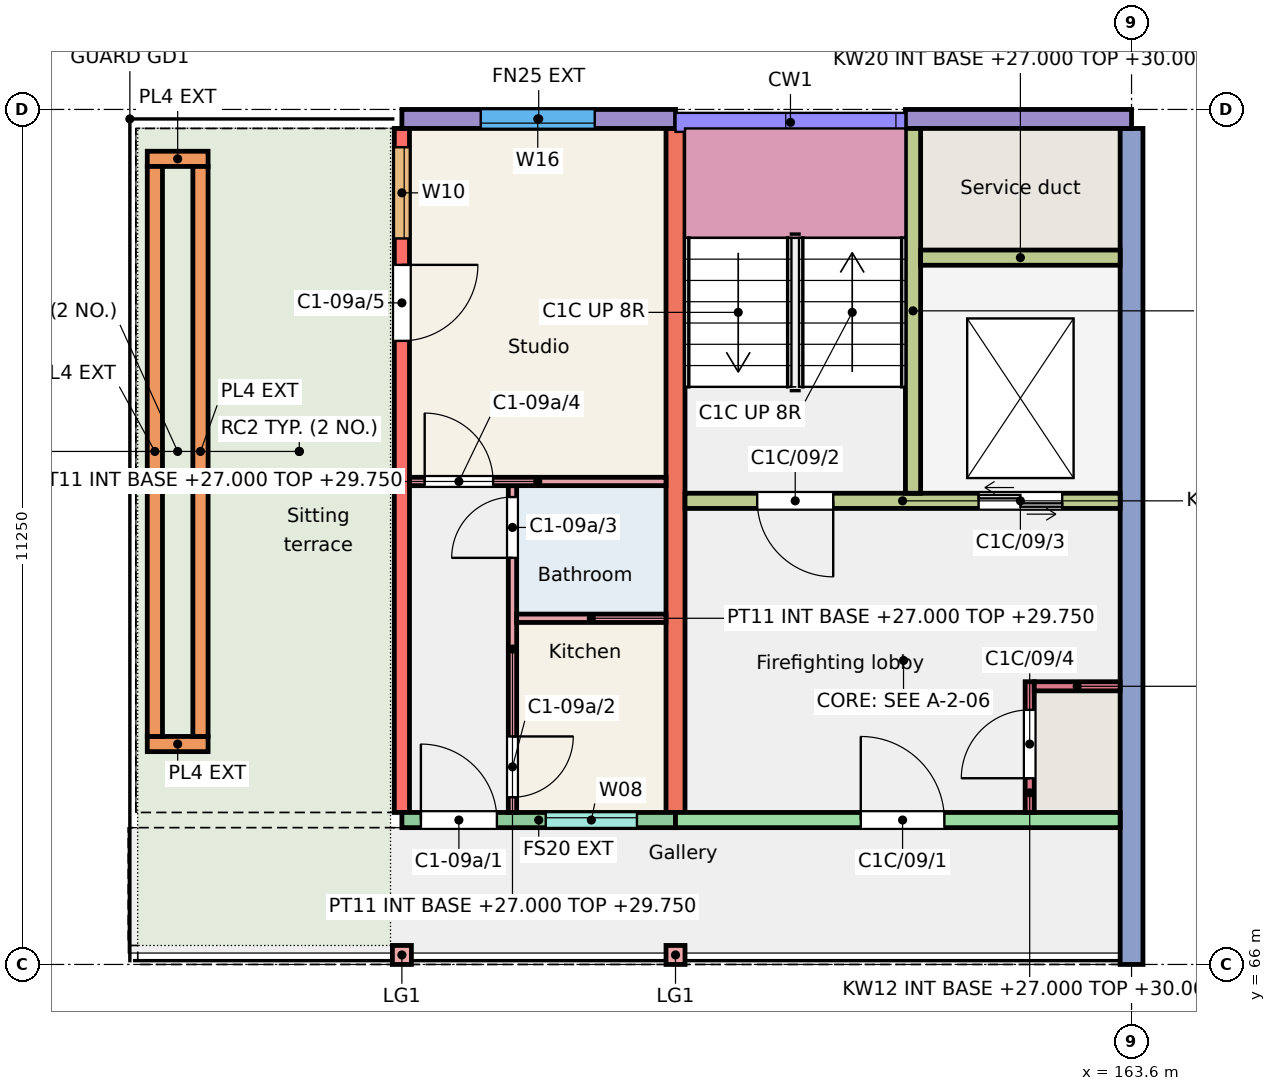
"""IFC4 building model, lengths in metres.
Left out: names, types, materials, properties, quantities, classifications, styles, units other than length and angle.
Written with IfcOpenShell. Run it as: python <this file> out.ifc"""

import sys

from ifc_helpers import new_model, si_unit, direction, frame, frame_2d, origin, origin_2d, place, context, subcontext, project, spatial, rectangle, extrude, element, fill, save


model = new_model("IFC4")
c1 = context("Model", 3, precision=1e-05, world=origin(), true_north=direction((0.0, 1.0)))
c2 = subcontext(c1, "Body", "Model", "MODEL_VIEW")
j1 = project(units=[si_unit("LENGTHUNIT", "METRE"), si_unit("PLANEANGLEUNIT", "RADIAN")], contexts=[c1])
p1 = place(None, origin())
s1 = spatial("IfcSite", under=j1, at=p1, CompositionType="ELEMENT")
p2 = place(p1, origin())
s2 = spatial("IfcBuilding", under=s1, at=p2, CompositionType="ELEMENT")
p3 = place(p2, frame((0.0, 0.0, 27.0)))
s3 = spatial("IfcBuildingStorey", under=s2, at=p3, CompositionType="ELEMENT", Elevation=27.0)
p4 = place(p3, frame((154.0, 68.0, 0.0), z_axis=(0.0, 0.0, 1.0), x_axis=(0.0, 1.0, 0.0)))
e1 = element("IfcWall", 1, at=p4, inside=s3, PredefinedType="SHEAR", context=c2, shape_type="SweptSolid", body=[
    extrude(rectangle(XDim=9.0, YDim=0.2, at=frame_2d((4.5, 0.0))), origin(), (0.0, 0.0, 1.0), 3.0),
])
p5 = place(p4, frame((7.552, 0.0, 0.9)))
e2 = element("IfcOpeningElement", 2, at=p5, cuts=e1, PredefinedType="OPENING", context=c2, shape_type="SweptSolid", body=[
    extrude(rectangle(XDim=1.2, YDim=1.5, at=frame_2d((0.6, 0.75))), frame((0.0, 0.11, 0.0), z_axis=(0.0, -1.0, 0.0), x_axis=(1.0, 0.0, 0.0)), (0.0, 0.0, 1.0), 0.22),
])
p6 = place(p4, frame((6.205, 0.0, 0.0)))
e3 = element("IfcOpeningElement", 3, at=p6, cuts=e1, PredefinedType="OPENING", context=c2, shape_type="SweptSolid", body=[
    extrude(rectangle(XDim=1.0, YDim=2.1, at=frame_2d((0.5, 1.05))), frame((0.0, 0.11, 0.0), z_axis=(0.0, -1.0, 0.0), x_axis=(1.0, 0.0, 0.0)), (0.0, 0.0, 1.0), 0.22),
])
p7 = place(p3, frame((157.6, 68.0, 0.0), z_axis=(0.0, 0.0, 1.0), x_axis=(0.0, 1.0, 0.0)))
e4 = element("IfcWall", 4, at=p7, inside=s3, PredefinedType="SHEAR", context=c2, shape_type="SweptSolid", body=[
    extrude(rectangle(XDim=9.0, YDim=0.25, at=frame_2d((4.5, 0.0))), origin(), (0.0, 0.0, 1.0), 3.0),
])
p8 = place(p3, frame((163.6, 66.0, 0.0), z_axis=(0.0, 0.0, 1.0), x_axis=(0.0, 1.0, 0.0)))
e5 = element("IfcWall", 5, at=p8, inside=s3, PredefinedType="SHEAR", context=c2, shape_type="SweptSolid", body=[
    extrude(rectangle(XDim=11.0, YDim=0.3, at=frame_2d((5.5, 0.0))), origin(), (0.0, 0.0, 1.0), 3.0),
])
p9 = place(p3, frame((154.0, 77.125, 0.0), z_axis=(0.0, 0.0, 1.0), x_axis=(1.0, 0.0, 0.0)))
e6 = element("IfcWall", 6, at=p9, inside=s3, PredefinedType="SOLIDWALL", context=c2, shape_type="SweptSolid", body=[
    extrude(rectangle(XDim=3.6, YDim=0.25, at=frame_2d((1.8, 0.0))), origin(), (0.0, 0.0, 1.0), 3.0),
])
p10 = place(p9, frame((1.038, 0.0, 0.9)))
e7 = element("IfcOpeningElement", 7, at=p10, cuts=e6, PredefinedType="OPENING", context=c2, shape_type="SweptSolid", body=[
    extrude(rectangle(XDim=1.5, YDim=1.5, at=frame_2d((0.75, 0.75))), frame((0.0, 0.135, 0.0), z_axis=(0.0, -1.0, 0.0), x_axis=(1.0, 0.0, 0.0)), (0.0, 0.0, 1.0), 0.27),
])
p11 = place(p3, frame((154.0, 67.9, 0.0), z_axis=(0.0, 0.0, 1.0), x_axis=(1.0, 0.0, 0.0)))
e8 = element("IfcWall", 8, at=p11, inside=s3, PredefinedType="SOLIDWALL", context=c2, shape_type="SweptSolid", body=[
    extrude(rectangle(XDim=3.6, YDim=0.2, at=frame_2d((1.8, 0.0))), origin(), (0.0, 0.0, 1.0), 3.0),
])
p12 = place(p11, frame((1.893, 0.0, 1.1)))
e9 = element("IfcOpeningElement", 9, at=p12, cuts=e8, PredefinedType="OPENING", context=c2, shape_type="SweptSolid", body=[
    extrude(rectangle(XDim=1.2, YDim=1.3, at=frame_2d((0.6, 0.65))), frame((0.0, 0.11, 0.0), z_axis=(0.0, -1.0, 0.0), x_axis=(1.0, 0.0, 0.0)), (0.0, 0.0, 1.0), 0.22),
])
p13 = place(p11, frame((0.25, 0.0, 0.0)))
e10 = element("IfcOpeningElement", 10, at=p13, cuts=e8, PredefinedType="OPENING", context=c2, shape_type="SweptSolid", body=[
    extrude(rectangle(XDim=1.0, YDim=2.1, at=frame_2d((0.5, 1.05))), frame((0.0, 0.11, 0.0), z_axis=(0.0, -1.0, 0.0), x_axis=(1.0, 0.0, 0.0)), (0.0, 0.0, 1.0), 0.22),
])
p14 = place(p3, frame((160.625, 77.125, 0.0), z_axis=(0.0, 0.0, 1.0), x_axis=(1.0, 0.0, 0.0)))
e11 = element("IfcWall", 11, at=p14, inside=s3, PredefinedType="SOLIDWALL", context=c2, shape_type="SweptSolid", body=[
    extrude(rectangle(XDim=2.975, YDim=0.25, at=frame_2d((1.488, 0.0))), origin(), (0.0, 0.0, 1.0), 3.0),
])
p15 = place(p3, frame((157.6, 67.9, 0.0), z_axis=(0.0, 0.0, 1.0), x_axis=(1.0, 0.0, 0.0)))
e12 = element("IfcWall", 12, at=p15, inside=s3, PredefinedType="SHEAR", context=c2, shape_type="SweptSolid", body=[
    extrude(rectangle(XDim=5.85, YDim=0.2, at=frame_2d((2.925, 0.0))), origin(), (0.0, 0.0, 1.0), 3.0),
])
p16 = place(p15, frame((2.438, 0.0, 0.0)))
e13 = element("IfcOpeningElement", 13, at=p16, cuts=e12, PredefinedType="OPENING", context=c2, shape_type="SweptSolid", body=[
    extrude(rectangle(XDim=1.1, YDim=2.1, at=frame_2d((0.55, 1.05))), frame((0.0, 0.11, 0.0), z_axis=(0.0, -1.0, 0.0), x_axis=(1.0, 0.0, 0.0)), (0.0, 0.0, 1.0), 0.22),
])
p17 = place(p3, frame((157.725, 72.1, 0.0), z_axis=(0.0, 0.0, 1.0), x_axis=(1.0, 0.0, 0.0)))
e14 = element("IfcWall", 14, at=p17, inside=s3, PredefinedType="SHEAR", context=c2, shape_type="SweptSolid", body=[
    extrude(rectangle(XDim=5.725, YDim=0.2, at=frame_2d((2.862, 0.0))), origin(), (0.0, 0.0, 1.0), 3.0),
])
p18 = place(p17, frame((0.95, 0.0, 0.0)))
e15 = element("IfcOpeningElement", 15, at=p18, cuts=e14, PredefinedType="OPENING", context=c2, shape_type="SweptSolid", body=[
    extrude(rectangle(XDim=1.0, YDim=2.1, at=frame_2d((0.5, 1.05))), frame((0.0, 0.11, 0.0), z_axis=(0.0, -1.0, 0.0), x_axis=(1.0, 0.0, 0.0)), (0.0, 0.0, 1.0), 0.22),
])
p19 = place(p17, frame((3.863, 0.0, 0.0)))
e16 = element("IfcOpeningElement", 16, at=p19, cuts=e14, PredefinedType="OPENING", context=c2, shape_type="SweptSolid", body=[
    extrude(rectangle(XDim=1.1, YDim=2.1, at=frame_2d((0.55, 1.05))), frame((0.0, 0.11, 0.0), z_axis=(0.0, -1.0, 0.0), x_axis=(1.0, 0.0, 0.0)), (0.0, 0.0, 1.0), 0.22),
])
p20 = place(p3, frame((160.725, 72.2, 0.0), z_axis=(0.0, 0.0, 1.0), x_axis=(0.0, 1.0, 0.0)))
e17 = element("IfcWall", 17, at=p20, inside=s3, PredefinedType="SHEAR", context=c2, shape_type="SweptSolid", body=[
    extrude(rectangle(XDim=4.8, YDim=0.2, at=frame_2d((2.4, 0.0))), origin(), (0.0, 0.0, 1.0), 3.0),
])
p21 = place(p3, frame((160.825, 75.3, 0.0), z_axis=(0.0, 0.0, 1.0), x_axis=(1.0, 0.0, 0.0)))
e18 = element("IfcWall", 18, at=p21, inside=s3, PredefinedType="SHEAR", context=c2, shape_type="SweptSolid", body=[
    extrude(rectangle(XDim=2.625, YDim=0.2, at=frame_2d((1.312, 0.0))), origin(), (0.0, 0.0, 1.0), 3.0),
])
p22 = place(p3, frame((162.26, 68.0, 0.0), z_axis=(0.0, 0.0, 1.0), x_axis=(0.0, 1.0, 0.0)))
e19 = element("IfcWall", 19, at=p22, inside=s3, PredefinedType="SHEAR", context=c2, shape_type="SweptSolid", body=[
    extrude(rectangle(XDim=1.72, YDim=0.12, at=frame_2d((0.86, 0.0))), origin(), (0.0, 0.0, 1.0), 3.0),
])
p23 = place(p22, frame((0.45, 0.0, 0.0)))
e20 = element("IfcOpeningElement", 20, at=p23, cuts=e19, PredefinedType="OPENING", context=c2, shape_type="SweptSolid", body=[
    extrude(rectangle(XDim=0.9, YDim=2.1, at=frame_2d((0.45, 1.05))), frame((0.0, 0.07, 0.0), z_axis=(0.0, -1.0, 0.0), x_axis=(1.0, 0.0, 0.0)), (0.0, 0.0, 1.0), 0.14),
])
p24 = place(p3, frame((162.32, 69.66, 0.0), z_axis=(0.0, 0.0, 1.0), x_axis=(1.0, 0.0, 0.0)))
e21 = element("IfcWall", 21, at=p24, inside=s3, PredefinedType="SHEAR", context=c2, shape_type="SweptSolid", body=[
    extrude(rectangle(XDim=1.13, YDim=0.12, at=frame_2d((0.565, 0.0))), origin(), (0.0, 0.0, 1.0), 3.0),
])
for number, where, z_axis, x_axis in (
    (22, (154.0, 66.125, 0.0), (0.0, 0.0, 1.0), (1.0, 0.0, 0.0)),
    (23, (157.6, 66.125, 0.0), (0.0, 0.0, 1.0), (1.0, 0.0, 0.0)),
):
    element("IfcColumn", number, at=place(p3, frame(where, z_axis=z_axis, x_axis=x_axis)), inside=s3, PredefinedType="COLUMN", context=c2, shape_type="SweptSolid", body=[
        extrude(rectangle(XDim=0.25, YDim=0.25, at=origin_2d()), origin(), (0.0, 0.0, 1.0), 3.0),
    ])
for number, where, z_axis, x_axis in (
    (24, (150.65, 68.9, 0.01), (0.0, 0.0, 1.0), (1.0, 0.0, 0.0)),
    (25, (150.65, 76.6, 0.01), (0.0, 0.0, 1.0), (1.0, 0.0, 0.0)),
):
    element("IfcWall", number, at=place(p3, frame(where, z_axis=z_axis, x_axis=x_axis)), inside=s3, PredefinedType="SOLIDWALL", context=c2, shape_type="SweptSolid", body=[
        extrude(rectangle(XDim=0.8, YDim=0.2, at=frame_2d((0.4, 0.0))), origin(), (0.0, 0.0, 1.0), 0.45),
    ])
for number, where, z_axis, x_axis in (
    (26, (150.75, 69.0, 0.01), (0.0, 0.0, 1.0), (0.0, 1.0, 0.0)),
    (27, (151.35, 69.0, 0.01), (0.0, 0.0, 1.0), (0.0, 1.0, 0.0)),
):
    element("IfcWall", number, at=place(p3, frame(where, z_axis=z_axis, x_axis=x_axis)), inside=s3, PredefinedType="SOLIDWALL", context=c2, shape_type="SweptSolid", body=[
        extrude(rectangle(XDim=7.5, YDim=0.2, at=frame_2d((3.75, 0.0))), origin(), (0.0, 0.0, 1.0), 0.45),
    ])
p25 = place(p3, frame((155.455, 68.0, 0.0), z_axis=(0.0, 0.0, 1.0), x_axis=(0.0, 1.0, 0.0)))
e28 = element("IfcWall", 28, at=p25, inside=s3, PredefinedType="PARTITIONING", context=c2, shape_type="SweptSolid", body=[
    extrude(rectangle(XDim=4.3, YDim=0.11, at=frame_2d((2.15, 0.0))), origin(), (0.0, 0.0, 1.0), 2.75),
])
p26 = place(p25, frame((0.2, 0.0, 0.0)))
e29 = element("IfcOpeningElement", 29, at=p26, cuts=e28, PredefinedType="OPENING", context=c2, shape_type="SweptSolid", body=[
    extrude(rectangle(XDim=0.8, YDim=2.1, at=frame_2d((0.4, 1.05))), frame((0.0, 0.065, 0.0), z_axis=(0.0, -1.0, 0.0), x_axis=(1.0, 0.0, 0.0)), (0.0, 0.0, 1.0), 0.13),
])
p27 = place(p25, frame((3.35, 0.0, 0.0)))
e30 = element("IfcOpeningElement", 30, at=p27, cuts=e28, PredefinedType="OPENING", context=c2, shape_type="SweptSolid", body=[
    extrude(rectangle(XDim=0.8, YDim=2.1, at=frame_2d((0.4, 1.05))), frame((0.0, 0.065, 0.0), z_axis=(0.0, -1.0, 0.0), x_axis=(1.0, 0.0, 0.0)), (0.0, 0.0, 1.0), 0.13),
])
p28 = place(p3, frame((155.51, 70.555, 0.0), z_axis=(0.0, 0.0, 1.0), x_axis=(1.0, 0.0, 0.0)))
e31 = element("IfcWall", 31, at=p28, inside=s3, PredefinedType="PARTITIONING", context=c2, shape_type="SweptSolid", body=[
    extrude(rectangle(XDim=1.965, YDim=0.11, at=frame_2d((0.982, 0.0))), origin(), (0.0, 0.0, 1.0), 2.75),
])
p29 = place(p3, frame((154.1, 72.355, 0.0), z_axis=(0.0, 0.0, 1.0), x_axis=(1.0, 0.0, 0.0)))
e32 = element("IfcWall", 32, at=p29, inside=s3, PredefinedType="PARTITIONING", context=c2, shape_type="SweptSolid", body=[
    extrude(rectangle(XDim=3.375, YDim=0.11, at=frame_2d((1.688, 0.0))), origin(), (0.0, 0.0, 1.0), 2.75),
])
p30 = place(p29, frame((0.2, 0.0, 0.0)))
e33 = element("IfcOpeningElement", 33, at=p30, cuts=e32, PredefinedType="OPENING", context=c2, shape_type="SweptSolid", body=[
    extrude(rectangle(XDim=0.9, YDim=2.1, at=frame_2d((0.45, 1.05))), frame((0.0, 0.065, 0.0), z_axis=(0.0, -1.0, 0.0), x_axis=(1.0, 0.0, 0.0)), (0.0, 0.0, 1.0), 0.13),
])
p31 = place(p12, origin())
e34 = element("IfcWindow", 34, at=p31, inside=s3, PartitioningType="SINGLE_PANEL", PredefinedType="WINDOW", context=c2, shape_type="SweptSolid", body=[
    extrude(rectangle(XDim=1.2, YDim=1.3, at=frame_2d((0.6, 0.65))), frame((0.0, 0.06, 0.0), z_axis=(0.0, -1.0, 0.0), x_axis=(1.0, 0.0, 0.0)), (0.0, 0.0, 1.0), 0.06),
])
fill(e9, e34)
p32 = place(p10, origin())
e35 = element("IfcWindow", 35, at=p32, inside=s3, PartitioningType="SINGLE_PANEL", PredefinedType="WINDOW", context=c2, shape_type="SweptSolid", body=[
    extrude(rectangle(XDim=1.5, YDim=1.5, at=frame_2d((0.75, 0.75))), frame((0.0, -0.025, 0.0), z_axis=(0.0, -1.0, 0.0), x_axis=(1.0, 0.0, 0.0)), (0.0, 0.0, 1.0), 0.06),
])
fill(e7, e35)
p33 = place(p5, origin())
e36 = element("IfcWindow", 36, at=p33, inside=s3, PartitioningType="SINGLE_PANEL", PredefinedType="WINDOW", context=c2, shape_type="SweptSolid", body=[
    extrude(rectangle(XDim=1.2, YDim=1.5, at=frame_2d((0.6, 0.75))), frame((0.0, 0.0, 0.0), z_axis=(0.0, -1.0, 0.0), x_axis=(1.0, 0.0, 0.0)), (0.0, 0.0, 1.0), 0.06),
])
fill(e2, e36)
p34 = place(p13, origin())
e37 = element("IfcDoor", 37, at=p34, inside=s3, OperationType="SINGLE_SWING_LEFT", PredefinedType="DOOR", context=c2, shape_type="SweptSolid", body=[
    extrude(rectangle(XDim=1.0, YDim=2.1, at=frame_2d((0.5, 1.05))), frame((0.0, 0.025, 0.0), z_axis=(0.0, -1.0, 0.0), x_axis=(1.0, 0.0, 0.0)), (0.0, 0.0, 1.0), 0.05),
])
fill(e10, e37)
p35 = place(p26, origin())
e38 = element("IfcDoor", 38, at=p35, inside=s3, OperationType="SINGLE_SWING_RIGHT", PredefinedType="DOOR", context=c2, shape_type="SweptSolid", body=[
    extrude(rectangle(XDim=0.8, YDim=2.1, at=frame_2d((0.4, 1.05))), frame((0.0, 0.025, 0.0), z_axis=(0.0, -1.0, 0.0), x_axis=(1.0, 0.0, 0.0)), (0.0, 0.0, 1.0), 0.05),
])
fill(e29, e38)
p36 = place(p27, origin())
e39 = element("IfcDoor", 39, at=p36, inside=s3, OperationType="SINGLE_SWING_LEFT", PredefinedType="DOOR", context=c2, shape_type="SweptSolid", body=[
    extrude(rectangle(XDim=0.8, YDim=2.1, at=frame_2d((0.4, 1.05))), frame((0.0, 0.025, 0.0), z_axis=(0.0, -1.0, 0.0), x_axis=(1.0, 0.0, 0.0)), (0.0, 0.0, 1.0), 0.05),
])
fill(e30, e39)
p37 = place(p30, origin())
e40 = element("IfcDoor", 40, at=p37, inside=s3, OperationType="SINGLE_SWING_LEFT", PredefinedType="DOOR", context=c2, shape_type="SweptSolid", body=[
    extrude(rectangle(XDim=0.9, YDim=2.1, at=frame_2d((0.45, 1.05))), frame((0.0, 0.025, 0.0), z_axis=(0.0, -1.0, 0.0), x_axis=(1.0, 0.0, 0.0)), (0.0, 0.0, 1.0), 0.05),
])
fill(e33, e40)
p38 = place(p6, origin())
e41 = element("IfcDoor", 41, at=p38, inside=s3, OperationType="SINGLE_SWING_RIGHT", PredefinedType="DOOR", context=c2, shape_type="SweptSolid", body=[
    extrude(rectangle(XDim=1.0, YDim=2.1, at=frame_2d((0.5, 1.05))), frame((0.0, 0.025, 0.0), z_axis=(0.0, -1.0, 0.0), x_axis=(1.0, 0.0, 0.0)), (0.0, 0.0, 1.0), 0.05),
])
fill(e3, e41)
p39 = place(p16, origin())
e42 = element("IfcDoor", 42, at=p39, inside=s3, OperationType="SINGLE_SWING_LEFT", PredefinedType="DOOR", context=c2, shape_type="SweptSolid", body=[
    extrude(rectangle(XDim=1.1, YDim=2.1, at=frame_2d((0.55, 1.05))), frame((0.0, 0.025, 0.0), z_axis=(0.0, -1.0, 0.0), x_axis=(1.0, 0.0, 0.0)), (0.0, 0.0, 1.0), 0.05),
])
fill(e13, e42)
p40 = place(p18, origin())
e43 = element("IfcDoor", 43, at=p40, inside=s3, OperationType="SINGLE_SWING_RIGHT", PredefinedType="DOOR", context=c2, shape_type="SweptSolid", body=[
    extrude(rectangle(XDim=1.0, YDim=2.1, at=frame_2d((0.5, 1.05))), frame((0.0, 0.025, 0.0), z_axis=(0.0, -1.0, 0.0), x_axis=(1.0, 0.0, 0.0)), (0.0, 0.0, 1.0), 0.05),
])
fill(e15, e43)
p41 = place(p19, origin())
e44 = element("IfcDoor", 44, at=p41, inside=s3, OperationType="DOUBLE_DOOR_SLIDING", PredefinedType="DOOR", context=c2, shape_type="SweptSolid", body=[
    extrude(rectangle(XDim=1.1, YDim=2.1, at=frame_2d((0.55, 1.05))), frame((0.0, 0.025, 0.0), z_axis=(0.0, -1.0, 0.0), x_axis=(1.0, 0.0, 0.0)), (0.0, 0.0, 1.0), 0.05),
])
fill(e16, e44)
p42 = place(p23, origin())
e45 = element("IfcDoor", 45, at=p42, inside=s3, OperationType="SINGLE_SWING_LEFT", PredefinedType="DOOR", context=c2, shape_type="SweptSolid", body=[
    extrude(rectangle(XDim=0.9, YDim=2.1, at=frame_2d((0.45, 1.05))), frame((0.0, 0.025, 0.0), z_axis=(0.0, -1.0, 0.0), x_axis=(1.0, 0.0, 0.0)), (0.0, 0.0, 1.0), 0.05),
])
fill(e20, e45)
save(model, sys.argv[1])
